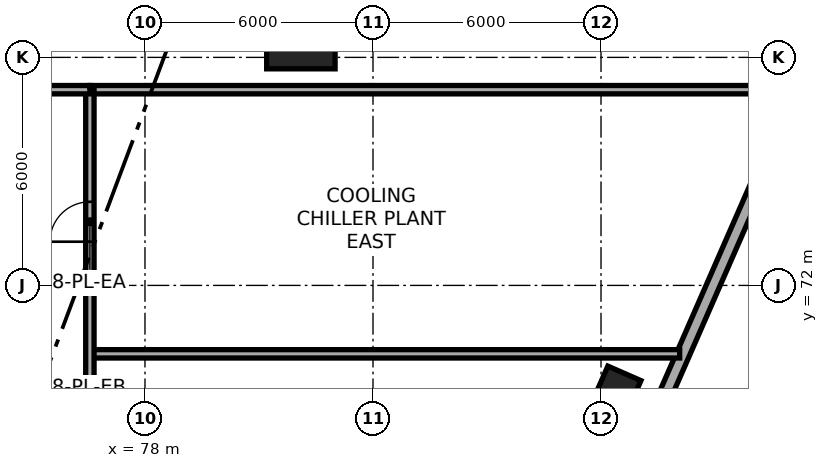
"""IFC4 building model, lengths in metres.
Left out: names, types, materials, properties, quantities, classifications, styles, units other than length and angle.
Written with IfcOpenShell. Run it as: python <this file> out.ifc"""

import sys

from ifc_helpers import new_model, si_unit, direction, frame, frame_2d, origin, origin_2d, place, context, subcontext, project, spatial, rectangle, extrude, element, fill, save


model = new_model("IFC4")
c1 = context("Model", 3, precision=1e-05, world=origin(), true_north=direction((0.0, 1.0)))
c2 = subcontext(c1, "Body", "Model", "MODEL_VIEW")
j1 = project(units=[si_unit("LENGTHUNIT", "METRE"), si_unit("PLANEANGLEUNIT", "RADIAN")], contexts=[c1])
p1 = place(None, origin())
s1 = spatial("IfcSite", under=j1, at=p1, CompositionType="ELEMENT")
p2 = place(p1, origin())
s2 = spatial("IfcBuilding", under=s1, at=p2, CompositionType="ELEMENT")
p3 = place(p2, frame((0.0, 0.0, 70.8)))
s3 = spatial("IfcBuildingStorey", under=s2, at=p3, CompositionType="ELEMENT", Elevation=70.8)
p4 = place(p3, frame((82.102, 78.599, 0.0), z_axis=(0.0, 0.0, 1.0), x_axis=(1.0, 0.0, 0.0)))
e1 = element("IfcColumn", 1, at=p4, inside=s3, PredefinedType="COLUMN", context=c2, shape_type="SweptSolid", body=[
    extrude(rectangle(XDim=1.8, YDim=1.8, at=origin_2d()), origin(), (0.0, 0.0, 1.0), 4.2),
])
p5 = place(p3, frame((90.496, 69.261, 0.003), z_axis=(-0.034091159892, -0.005003139506, 0.99940620441), x_axis=(0.964106610004, -0.263632228909, 0.03156726828)))
e2 = element("IfcColumn", 2, at=p5, inside=s3, PredefinedType="COLUMN", context=c2, shape_type="SweptSolid", body=[
    extrude(rectangle(XDim=0.95, YDim=0.95, at=origin_2d()), origin(), (0.0, 0.0, 1.0), 4.197),
])
p6 = place(p3, frame((98.114, 83.803, 0.0), z_axis=(0.0, 0.0, 1.0), x_axis=(-0.400832536075, -0.916151340131, 0.0)))
e3 = element("IfcWall", 3, at=p6, inside=s3, PredefinedType="STANDARD", context=c2, shape_type="SweptSolid", body=[
    extrude(rectangle(XDim=68.233, YDim=0.34, at=frame_2d((34.117, 0.0))), origin(), (0.0, 0.0, 1.0), 0.85),
])
p7 = place(p3, frame((76.55, 77.15, 0.0), z_axis=(0.0, 0.0, 1.0), x_axis=(1.0, 0.0, 0.0)))
e4 = element("IfcWall", 4, at=p7, inside=s3, PredefinedType="PARTITIONING", context=c2, shape_type="SweptSolid", body=[
    extrude(rectangle(XDim=18.561, YDim=0.22, at=frame_2d((9.28, 0.0))), origin(), (0.0, 0.0, 1.0), 3.055),
])
p8 = place(p3, frame((76.55, 70.2, 0.0), z_axis=(0.0, 0.0, 1.0), x_axis=(1.0, 0.0, 0.0)))
e5 = element("IfcWall", 5, at=p8, inside=s3, PredefinedType="PARTITIONING", context=c2, shape_type="SweptSolid", body=[
    extrude(rectangle(XDim=15.52, YDim=0.22, at=frame_2d((7.76, 0.0))), origin(), (0.0, 0.0, 1.0), 3.055),
])
p9 = place(p3, frame((76.55, 58.85, 0.0), z_axis=(0.0, 0.0, 1.0), x_axis=(0.0, 1.0, 0.0)))
e6 = element("IfcWall", 6, at=p9, inside=s3, PredefinedType="PARTITIONING", context=c2, shape_type="SweptSolid", body=[
    extrude(rectangle(XDim=18.3, YDim=0.22, at=frame_2d((9.15, 0.0))), origin(), (0.0, 0.0, 1.0), 3.205),
])
p10 = place(p9, frame((8.321, 0.0, 0.0)))
e7 = element("IfcOpeningElement", 7, at=p10, cuts=e6, PredefinedType="OPENING", context=c2, shape_type="SweptSolid", body=[
    extrude(rectangle(XDim=1.05, YDim=2.15, at=frame_2d((0.525, 1.075))), frame((0.0, 0.12, 0.0), z_axis=(0.0, -1.0, 0.0), x_axis=(1.0, 0.0, 0.0)), (0.0, 0.0, 1.0), 0.24),
])
p11 = place(p9, frame((14.3, 0.0, 0.0)))
e8 = element("IfcOpeningElement", 8, at=p11, cuts=e6, PredefinedType="OPENING", context=c2, shape_type="SweptSolid", body=[
    extrude(rectangle(XDim=1.05, YDim=2.15, at=frame_2d((0.525, 1.075))), frame((0.0, 0.12, 0.0), z_axis=(0.0, -1.0, 0.0), x_axis=(1.0, 0.0, 0.0)), (0.0, 0.0, 1.0), 0.24),
])
p12 = place(p3, frame((55.45, 77.15, 0.0), z_axis=(0.0, 0.0, 1.0), x_axis=(1.0, 0.0, 0.0)))
e9 = element("IfcWall", 9, at=p12, inside=s3, PredefinedType="PARTITIONING", context=c2, shape_type="SweptSolid", body=[
    extrude(rectangle(XDim=21.1, YDim=0.22, at=frame_2d((10.55, 0.0))), origin(), (0.0, 0.0, 1.0), 3.205),
])
p13 = place(p12, frame((1.25, 0.0, 0.0)))
e10 = element("IfcOpeningElement", 10, at=p13, cuts=e9, PredefinedType="OPENING", context=c2, shape_type="SweptSolid", body=[
    extrude(rectangle(XDim=1.05, YDim=2.15, at=frame_2d((0.525, 1.075))), frame((0.0, 0.12, 0.0), z_axis=(0.0, -1.0, 0.0), x_axis=(1.0, 0.0, 0.0)), (0.0, 0.0, 1.0), 0.24),
])
p14 = place(p12, frame((6.525, 0.0, 0.0)))
e11 = element("IfcOpeningElement", 11, at=p14, cuts=e9, PredefinedType="OPENING", context=c2, shape_type="SweptSolid", body=[
    extrude(rectangle(XDim=1.05, YDim=2.15, at=frame_2d((0.525, 1.075))), frame((0.0, 0.12, 0.0), z_axis=(0.0, -1.0, 0.0), x_axis=(1.0, 0.0, 0.0)), (0.0, 0.0, 1.0), 0.24),
])
p15 = place(p12, frame((11.801, 0.0, 0.0)))
e12 = element("IfcOpeningElement", 12, at=p15, cuts=e9, PredefinedType="OPENING", context=c2, shape_type="SweptSolid", body=[
    extrude(rectangle(XDim=1.05, YDim=2.15, at=frame_2d((0.525, 1.075))), frame((0.0, 0.12, 0.0), z_axis=(0.0, -1.0, 0.0), x_axis=(1.0, 0.0, 0.0)), (0.0, 0.0, 1.0), 0.24),
])
p16 = place(p12, frame((18.9, 0.0, 0.0)))
e13 = element("IfcOpeningElement", 13, at=p16, cuts=e9, PredefinedType="OPENING", context=c2, shape_type="SweptSolid", body=[
    extrude(rectangle(XDim=1.05, YDim=2.15, at=frame_2d((0.525, 1.075))), frame((0.0, 0.12, 0.0), z_axis=(0.0, -1.0, 0.0), x_axis=(1.0, 0.0, 0.0)), (0.0, 0.0, 1.0), 0.24),
])
p17 = place(p11, origin())
e14 = element("IfcDoor", 14, at=p17, inside=s3, OperationType="SINGLE_SWING_LEFT", PredefinedType="DOOR", context=c2, shape_type="SweptSolid", body=[
    extrude(rectangle(XDim=1.05, YDim=2.15, at=frame_2d((0.525, 1.075))), frame((0.0, 0.025, 0.0), z_axis=(0.0, -1.0, 0.0), x_axis=(1.0, 0.0, 0.0)), (0.0, 0.0, 1.0), 0.05),
])
fill(e8, e14)
save(model, sys.argv[1])
